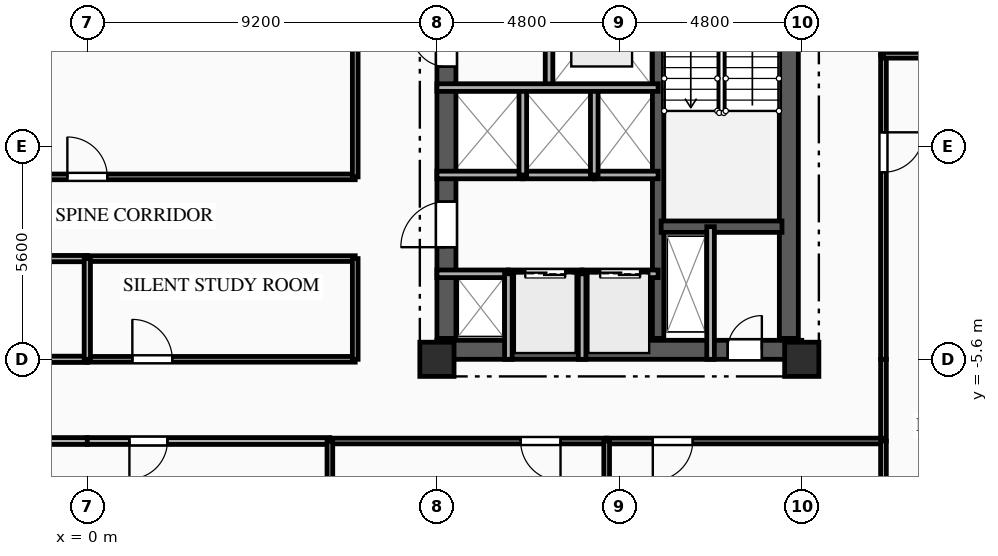
"""IFC4 building model, lengths in metres.
Left out: names, types, materials, properties, quantities, classifications, styles, units other than length and angle.
Written with IfcOpenShell. Run it as: python <this file> out.ifc"""

import sys

from ifc_helpers import new_model, si_unit, direction, frame, frame_2d, origin, origin_2d, place, context, subcontext, project, spatial, rectangle, extrude, element, fill, save


model = new_model("IFC4")
c1 = context("Model", 3, precision=1e-05, world=origin(), true_north=direction((0.0, 1.0)))
c2 = subcontext(c1, "Body", "Model", "MODEL_VIEW")
j1 = project(units=[si_unit("LENGTHUNIT", "METRE"), si_unit("PLANEANGLEUNIT", "RADIAN")], contexts=[c1])
p1 = place(None, origin())
s1 = spatial("IfcSite", under=j1, at=p1, CompositionType="ELEMENT")
p2 = place(p1, origin())
s2 = spatial("IfcBuilding", under=s1, at=p2, CompositionType="ELEMENT")
p3 = place(p2, frame((0.0, 0.0, 164.5)))
s3 = spatial("IfcBuildingStorey", under=s2, at=p3, CompositionType="ELEMENT", Elevation=164.5)
for number, where, z_axis, x_axis in (
    (1, (9.2, -5.6, 0.0), (0.0, 0.0, 1.0), (1.0, 0.0, 0.0)),
    (2, (18.8, -5.6, 0.0), (0.0, 0.0, 1.0), (1.0, 0.0, 0.0)),
):
    element("IfcColumn", number, at=place(p3, frame(where, z_axis=z_axis, x_axis=x_axis)), inside=s3, PredefinedType="COLUMN", context=c2, shape_type="SweptSolid", body=[
        extrude(rectangle(XDim=0.9, YDim=0.9, at=origin_2d()), origin(), (0.0, 0.0, 1.0), 3.35),
    ])
p4 = place(p3, frame((9.2, -5.35, 0.0), z_axis=(0.0, 0.0, 1.0), x_axis=(1.0, 0.0, 0.0)))
e3 = element("IfcWall", 3, at=p4, inside=s3, PredefinedType="SHEAR", context=c2, shape_type="SweptSolid", body=[
    extrude(rectangle(XDim=9.6, YDim=0.5, at=frame_2d((4.8, 0.0))), origin(), (0.0, 0.0, 1.0), 3.04),
])
p5 = place(p4, frame((7.65, 0.0, 0.0)))
e4 = element("IfcOpeningElement", 4, at=p5, cuts=e3, PredefinedType="OPENING", context=c2, shape_type="SweptSolid", body=[
    extrude(rectangle(XDim=0.9, YDim=2.1, at=frame_2d((0.45, 1.05))), frame((0.0, 0.26, 0.0), z_axis=(0.0, -1.0, 0.0), x_axis=(1.0, 0.0, 0.0)), (0.0, 0.0, 1.0), 0.52),
])
p6 = place(p3, frame((9.45, -5.05, 0.0), z_axis=(0.0, 0.0, 1.0), x_axis=(0.0, 1.0, 0.0)))
e5 = element("IfcWall", 5, at=p6, inside=s3, PredefinedType="SHEAR", context=c2, shape_type="SweptSolid", body=[
    extrude(rectangle(XDim=10.1, YDim=0.5, at=frame_2d((5.05, 0.0))), origin(), (0.0, 0.0, 1.0), 3.04),
])
p7 = place(p6, frame((7.15, 0.0, 0.0)))
e6 = element("IfcOpeningElement", 6, at=p7, cuts=e5, PredefinedType="OPENING", context=c2, shape_type="SweptSolid", body=[
    extrude(rectangle(XDim=0.9, YDim=2.1, at=frame_2d((0.45, 1.05))), frame((0.0, 0.26, 0.0), z_axis=(0.0, -1.0, 0.0), x_axis=(1.0, 0.0, 0.0)), (0.0, 0.0, 1.0), 0.52),
])
p8 = place(p6, frame((2.4, 0.0, 0.0)))
e7 = element("IfcOpeningElement", 7, at=p8, cuts=e5, PredefinedType="OPENING", context=c2, shape_type="SweptSolid", body=[
    extrude(rectangle(XDim=1.2, YDim=2.15, at=frame_2d((0.6, 1.075))), frame((0.0, 0.26, 0.0), z_axis=(0.0, -1.0, 0.0), x_axis=(1.0, 0.0, 0.0)), (0.0, 0.0, 1.0), 0.52),
])
p9 = place(p3, frame((18.46, -5.05, 0.0), z_axis=(0.0, 0.0, 1.0), x_axis=(0.0, 1.0, 0.0)))
e8 = element("IfcWall", 8, at=p9, inside=s3, PredefinedType="SHEAR", context=c2, shape_type="SweptSolid", body=[
    extrude(rectangle(XDim=10.1, YDim=0.5, at=frame_2d((5.05, 0.0))), origin(), (0.0, 0.0, 1.0), 3.04),
])
p10 = place(p3, frame((15.02, -5.05, 0.0), z_axis=(0.0, 0.0, 1.0), x_axis=(0.0, 1.0, 0.0)))
e9 = element("IfcWall", 9, at=p10, inside=s3, PredefinedType="SHEAR", context=c2, shape_type="SweptSolid", body=[
    extrude(rectangle(XDim=10.1, YDim=0.3, at=frame_2d((5.05, 0.0))), origin(), (0.0, 0.0, 1.0), 3.04),
])
p11 = place(p3, frame((15.1, -2.11, 0.0), z_axis=(0.0, 0.0, 1.0), x_axis=(1.0, 0.0, 0.0)))
e10 = element("IfcWall", 10, at=p11, inside=s3, PredefinedType="SHEAR", context=c2, shape_type="SweptSolid", body=[
    extrude(rectangle(XDim=3.18, YDim=0.3, at=frame_2d((1.59, 0.0))), origin(), (0.0, 0.0, 1.0), 3.04),
])
p12 = place(p3, frame((16.4, -2.11, 0.0), z_axis=(0.0, 0.0, 1.0), x_axis=(0.0, -1.0, 0.0)))
e11 = element("IfcWall", 11, at=p12, inside=s3, PredefinedType="PARTITIONING", context=c2, shape_type="SweptSolid", body=[
    extrude(rectangle(XDim=3.49, YDim=0.2, at=frame_2d((1.745, 0.0))), origin(), (0.0, 0.0, 1.0), 3.04),
])
p13 = place(p3, frame((12.15, 5.6, 0.0), z_axis=(0.0, 0.0, 1.0), x_axis=(0.0, -1.0, 0.0)))
e12 = element("IfcWall", 12, at=p13, inside=s3, PredefinedType="PARTITIONING", context=c2, shape_type="SweptSolid", body=[
    extrude(rectangle(XDim=4.05, YDim=0.2, at=frame_2d((2.025, 0.0))), origin(), (0.0, 0.0, 1.0), 3.04),
])
p14 = place(p3, frame((9.2, -3.35, 0.0), z_axis=(0.0, 0.0, 1.0), x_axis=(1.0, 0.0, 0.0)))
e13 = element("IfcWall", 13, at=p14, inside=s3, PredefinedType="PARTITIONING", context=c2, shape_type="SweptSolid", body=[
    extrude(rectangle(XDim=1.88, YDim=0.2, at=frame_2d((0.94, 0.0))), origin(), (0.0, 0.0, 1.0), 2.755),
])
p15 = place(p3, frame((11.08, -3.35, 0.0), z_axis=(0.0, 0.0, 1.0), x_axis=(1.0, 0.0, 0.0)))
e14 = element("IfcWall", 14, at=p15, inside=s3, PredefinedType="PARTITIONING", context=c2, shape_type="SweptSolid", body=[
    extrude(rectangle(XDim=1.94, YDim=0.2, at=frame_2d((0.97, 0.0))), origin(), (0.0, 0.0, 1.0), 3.04),
])
p16 = place(p15, frame((0.445, 0.0, 0.0)))
e15 = element("IfcOpeningElement", 15, at=p16, cuts=e14, PredefinedType="OPENING", context=c2, shape_type="SweptSolid", body=[
    extrude(rectangle(XDim=1.05, YDim=2.1, at=frame_2d((0.525, 1.05))), frame((0.0, 0.11, 0.0), z_axis=(0.0, -1.0, 0.0), x_axis=(1.0, 0.0, 0.0)), (0.0, 0.0, 1.0), 0.22),
])
p17 = place(p3, frame((13.02, -3.35, 0.0), z_axis=(0.0, 0.0, 1.0), x_axis=(1.0, 0.0, 0.0)))
e16 = element("IfcWall", 16, at=p17, inside=s3, PredefinedType="PARTITIONING", context=c2, shape_type="SweptSolid", body=[
    extrude(rectangle(XDim=2.0, YDim=0.2, at=frame_2d((1.0, 0.0))), origin(), (0.0, 0.0, 1.0), 3.04),
])
p18 = place(p17, frame((0.475, 0.0, 0.0)))
e17 = element("IfcOpeningElement", 17, at=p18, cuts=e16, PredefinedType="OPENING", context=c2, shape_type="SweptSolid", body=[
    extrude(rectangle(XDim=1.05, YDim=2.1, at=frame_2d((0.525, 1.05))), frame((0.0, 0.11, 0.0), z_axis=(0.0, -1.0, 0.0), x_axis=(1.0, 0.0, 0.0)), (0.0, 0.0, 1.0), 0.22),
])
p19 = place(p3, frame((11.46, -0.75, 0.0), z_axis=(0.0, 0.0, 1.0), x_axis=(-1.0, 0.0, 0.0)))
e18 = element("IfcWall", 18, at=p19, inside=s3, PredefinedType="PARTITIONING", context=c2, shape_type="SweptSolid", body=[
    extrude(rectangle(XDim=2.26, YDim=0.2, at=frame_2d((1.13, 0.0))), origin(), (0.0, 0.0, 1.0), 3.04),
])
p20 = place(p3, frame((13.34, -0.75, 0.0), z_axis=(0.0, 0.0, 1.0), x_axis=(-1.0, 0.0, 0.0)))
e19 = element("IfcWall", 19, at=p20, inside=s3, PredefinedType="PARTITIONING", context=c2, shape_type="SweptSolid", body=[
    extrude(rectangle(XDim=1.88, YDim=0.2, at=frame_2d((0.94, 0.0))), origin(), (0.0, 0.0, 1.0), 3.04),
])
p21 = place(p3, frame((15.02, -0.75, 0.0), z_axis=(0.0, 0.0, 1.0), x_axis=(-1.0, 0.0, 0.0)))
e20 = element("IfcWall", 20, at=p21, inside=s3, PredefinedType="PARTITIONING", context=c2, shape_type="SweptSolid", body=[
    extrude(rectangle(XDim=1.68, YDim=0.2, at=frame_2d((0.84, 0.0))), origin(), (0.0, 0.0, 1.0), 3.04),
])
for number, where, z_axis, x_axis in (
    (21, (11.08, -5.6, 0.0), (0.0, 0.0, 1.0), (0.0, 1.0, 0.0)),
    (22, (13.02, -5.6, 0.0), (0.0, 0.0, 1.0), (0.0, 1.0, 0.0)),
):
    element("IfcWall", number, at=place(p3, frame(where, z_axis=z_axis, x_axis=x_axis)), inside=s3, PredefinedType="PARTITIONING", context=c2, shape_type="SweptSolid", body=[
        extrude(rectangle(XDim=2.25, YDim=0.2, at=frame_2d((1.125, 0.0))), origin(), (0.0, 0.0, 1.0), 3.04),
    ])
for number, where, z_axis, x_axis in (
    (23, (11.46, -0.75, 0.0), (0.0, 0.0, 1.0), (0.0, 1.0, 0.0)),
    (24, (13.34, -0.75, 0.0), (0.0, 0.0, 1.0), (0.0, 1.0, 0.0)),
):
    element("IfcWall", number, at=place(p3, frame(where, z_axis=z_axis, x_axis=x_axis)), inside=s3, PredefinedType="PARTITIONING", context=c2, shape_type="SweptSolid", body=[
        extrude(rectangle(XDim=2.3, YDim=0.2, at=frame_2d((1.15, 0.0))), origin(), (0.0, 0.0, 1.0), 3.04),
    ])
p22 = place(p3, frame((0.0, -7.75, 0.0), z_axis=(0.0, 0.0, 1.0), x_axis=(-1.0, 0.0, 0.0)))
e25 = element("IfcWall", 25, at=p22, inside=s3, PredefinedType="PARTITIONING", context=c2, shape_type="SweptSolid", body=[
    extrude(rectangle(XDim=5.133, YDim=0.18, at=frame_2d((2.566, 0.0))), origin(), (0.0, 0.0, 1.0), 3.04),
])
p23 = place(p3, frame((-7.05, -5.6, 0.0), z_axis=(0.0, 0.0, 1.0), x_axis=(1.0, 0.0, 0.0)))
e26 = element("IfcWall", 26, at=p23, inside=s3, PredefinedType="PARTITIONING", context=c2, shape_type="SweptSolid", body=[
    extrude(rectangle(XDim=7.05, YDim=0.165, at=frame_2d((3.525, 0.0))), origin(), (0.0, 0.0, 1.0), 2.525),
])
p24 = place(p23, frame((4.728, 0.0, 0.0)))
e27 = element("IfcOpeningElement", 27, at=p24, cuts=e26, PredefinedType="OPENING", context=c2, shape_type="SweptSolid", body=[
    extrude(rectangle(XDim=1.15, YDim=2.15, at=frame_2d((0.575, 1.075))), frame((0.0, 0.093, 0.0), z_axis=(0.0, -1.0, 0.0), x_axis=(1.0, 0.0, 0.0)), (0.0, 0.0, 1.0), 0.185),
])
p25 = place(p3, frame((20.95, -5.6, 0.0), z_axis=(0.0, 0.0, 1.0), x_axis=(0.0, -1.0, 0.0)))
e28 = element("IfcWall", 28, at=p25, inside=s3, PredefinedType="PARTITIONING", context=c2, shape_type="SweptSolid", body=[
    extrude(rectangle(XDim=2.15, YDim=0.15, at=frame_2d((1.075, 0.0))), origin(), (0.0, 0.0, 1.0), 3.04),
])
p26 = place(p3, frame((6.383, -7.75, 0.0), z_axis=(0.0, 0.0, 1.0), x_axis=(-1.0, 0.0, 0.0)))
e29 = element("IfcWall", 29, at=p26, inside=s3, PredefinedType="PARTITIONING", context=c2, shape_type="SweptSolid", body=[
    extrude(rectangle(XDim=6.383, YDim=0.18, at=frame_2d((3.191, 0.0))), origin(), (0.0, 0.0, 1.0), 3.04),
])
p27 = place(p26, frame((4.275, 0.0, 0.0)))
e30 = element("IfcOpeningElement", 30, at=p27, cuts=e29, PredefinedType="OPENING", context=c2, shape_type="SweptSolid", body=[
    extrude(rectangle(XDim=1.0, YDim=2.15, at=frame_2d((0.5, 1.075))), frame((0.0, 0.1, 0.0), z_axis=(0.0, -1.0, 0.0), x_axis=(1.0, 0.0, 0.0)), (0.0, 0.0, 1.0), 0.2),
])
p28 = place(p3, frame((13.667, -7.75, 0.0), z_axis=(0.0, 0.0, 1.0), x_axis=(-1.0, 0.0, 0.0)))
e31 = element("IfcWall", 31, at=p28, inside=s3, PredefinedType="PARTITIONING", context=c2, shape_type="SweptSolid", body=[
    extrude(rectangle(XDim=7.283, YDim=0.15, at=frame_2d((3.642, 0.0))), origin(), (0.0, 0.0, 1.0), 3.04),
])
p29 = place(p28, frame((1.214, 0.0, 0.0)))
e32 = element("IfcOpeningElement", 32, at=p29, cuts=e31, PredefinedType="OPENING", context=c2, shape_type="SweptSolid", body=[
    extrude(rectangle(XDim=1.05, YDim=2.15, at=frame_2d((0.525, 1.075))), frame((0.0, 0.085, 0.0), z_axis=(0.0, -1.0, 0.0), x_axis=(1.0, 0.0, 0.0)), (0.0, 0.0, 1.0), 0.17),
])
p30 = place(p3, frame((20.95, -7.75, 0.0), z_axis=(0.0, 0.0, 1.0), x_axis=(-1.0, 0.0, 0.0)))
e33 = element("IfcWall", 33, at=p30, inside=s3, PredefinedType="PARTITIONING", context=c2, shape_type="SweptSolid", body=[
    extrude(rectangle(XDim=7.283, YDim=0.15, at=frame_2d((3.642, 0.0))), origin(), (0.0, 0.0, 1.0), 3.04),
])
p31 = place(p30, frame((5.019, 0.0, 0.0)))
e34 = element("IfcOpeningElement", 34, at=p31, cuts=e33, PredefinedType="OPENING", context=c2, shape_type="SweptSolid", body=[
    extrude(rectangle(XDim=1.05, YDim=2.15, at=frame_2d((0.525, 1.075))), frame((0.0, 0.085, 0.0), z_axis=(0.0, -1.0, 0.0), x_axis=(1.0, 0.0, 0.0)), (0.0, 0.0, 1.0), 0.17),
])
p32 = place(p3, frame((0.0, -5.6, 0.0), z_axis=(0.0, 0.0, 1.0), x_axis=(1.0, 0.0, 0.0)))
e35 = element("IfcWall", 35, at=p32, inside=s3, PredefinedType="PARTITIONING", context=c2, shape_type="SweptSolid", body=[
    extrude(rectangle(XDim=7.05, YDim=0.15, at=frame_2d((3.525, 0.0))), origin(), (0.0, 0.0, 1.0), 2.525),
])
p33 = place(p32, frame((1.185, 0.0, 0.0)))
e36 = element("IfcOpeningElement", 36, at=p33, cuts=e35, PredefinedType="OPENING", context=c2, shape_type="SweptSolid", body=[
    extrude(rectangle(XDim=1.05, YDim=2.15, at=frame_2d((0.525, 1.075))), frame((0.0, 0.085, 0.0), z_axis=(0.0, -1.0, 0.0), x_axis=(1.0, 0.0, 0.0)), (0.0, 0.0, 1.0), 0.17),
])
p34 = place(p3, frame((20.95, 2.4, 0.0), z_axis=(0.0, 0.0, 1.0), x_axis=(0.0, -1.0, 0.0)))
e37 = element("IfcWall", 37, at=p34, inside=s3, PredefinedType="PARTITIONING", context=c2, shape_type="SweptSolid", body=[
    extrude(rectangle(XDim=8.0, YDim=0.15, at=frame_2d((4.0, 0.0))), origin(), (0.0, 0.0, 1.0), 3.04),
])
p35 = place(p34, frame((2.028, 0.0, 0.0)))
e38 = element("IfcOpeningElement", 38, at=p35, cuts=e37, PredefinedType="OPENING", context=c2, shape_type="SweptSolid", body=[
    extrude(rectangle(XDim=1.05, YDim=2.15, at=frame_2d((0.525, 1.075))), frame((0.0, 0.085, 0.0), z_axis=(0.0, -1.0, 0.0), x_axis=(1.0, 0.0, 0.0)), (0.0, 0.0, 1.0), 0.17),
])
p36 = place(p3, frame((20.95, 8.5, 0.0), z_axis=(0.0, 0.0, 1.0), x_axis=(0.0, -1.0, 0.0)))
e39 = element("IfcWall", 39, at=p36, inside=s3, PredefinedType="PARTITIONING", context=c2, shape_type="SweptSolid", body=[
    extrude(rectangle(XDim=6.1, YDim=0.15, at=frame_2d((3.05, 0.0))), origin(), (0.0, 0.0, 1.0), 3.04),
])
p37 = place(p36, frame((3.984, 0.0, 0.0)))
e40 = element("IfcOpeningElement", 40, at=p37, cuts=e39, PredefinedType="OPENING", context=c2, shape_type="SweptSolid", body=[
    extrude(rectangle(XDim=1.05, YDim=2.15, at=frame_2d((0.525, 1.075))), frame((0.0, 0.085, 0.0), z_axis=(0.0, -1.0, 0.0), x_axis=(1.0, 0.0, 0.0)), (0.0, 0.0, 1.0), 0.17),
])
p38 = place(p3, frame((-7.05, -0.8, 0.0), z_axis=(0.0, 0.0, 1.0), x_axis=(1.0, 0.0, 0.0)))
e41 = element("IfcWall", 41, at=p38, inside=s3, PredefinedType="PARTITIONING", context=c2, shape_type="SweptSolid", body=[
    extrude(rectangle(XDim=14.1, YDim=0.15, at=frame_2d((7.05, 0.0))), origin(), (0.0, 0.0, 1.0), 3.04),
])
p39 = place(p38, frame((6.525, 0.0, 0.0)))
e42 = element("IfcOpeningElement", 42, at=p39, cuts=e41, PredefinedType="OPENING", context=c2, shape_type="SweptSolid", body=[
    extrude(rectangle(XDim=1.05, YDim=2.15, at=frame_2d((0.525, 1.075))), frame((0.0, 0.085, 0.0), z_axis=(0.0, -1.0, 0.0), x_axis=(1.0, 0.0, 0.0)), (0.0, 0.0, 1.0), 0.17),
])
p40 = place(p3, frame((0.0, -2.95, 0.0), z_axis=(0.0, 0.0, 1.0), x_axis=(-1.0, 0.0, 0.0)))
e43 = element("IfcWall", 43, at=p40, inside=s3, PredefinedType="PARTITIONING", context=c2, shape_type="SweptSolid", body=[
    extrude(rectangle(XDim=7.05, YDim=0.165, at=frame_2d((3.525, 0.0))), origin(), (0.0, 0.0, 1.0), 3.04),
])
p41 = place(p3, frame((7.05, -2.95, 0.0), z_axis=(0.0, 0.0, 1.0), x_axis=(-1.0, 0.0, 0.0)))
e44 = element("IfcWall", 44, at=p41, inside=s3, PredefinedType="PARTITIONING", context=c2, shape_type="SweptSolid", body=[
    extrude(rectangle(XDim=7.05, YDim=0.15, at=frame_2d((3.525, 0.0))), origin(), (0.0, 0.0, 1.0), 3.04),
])
p42 = place(p3, frame((7.05, -0.8, 0.0), z_axis=(0.0, 0.0, 1.0), x_axis=(0.0, 1.0, 0.0)))
e45 = element("IfcWall", 45, at=p42, inside=s3, PredefinedType="PARTITIONING", context=c2, shape_type="SweptSolid", body=[
    extrude(rectangle(XDim=9.3, YDim=0.15, at=frame_2d((4.65, 0.0))), origin(), (0.0, 0.0, 1.0), 3.04),
])
p43 = place(p3, frame((7.05, -5.6, 0.0), z_axis=(0.0, 0.0, 1.0), x_axis=(0.0, 1.0, 0.0)))
e46 = element("IfcWall", 46, at=p43, inside=s3, PredefinedType="PARTITIONING", context=c2, shape_type="SweptSolid", body=[
    extrude(rectangle(XDim=2.65, YDim=0.15, at=frame_2d((1.325, 0.0))), origin(), (0.0, 0.0, 1.0), 3.04),
])
p44 = place(p3, frame((20.95, 2.4, 0.0), z_axis=(0.0, 0.0, 1.0), x_axis=(1.0, 0.0, 0.0)))
e47 = element("IfcWall", 47, at=p44, inside=s3, PredefinedType="PARTITIONING", context=c2, shape_type="SweptSolid", body=[
    extrude(rectangle(XDim=6.05, YDim=0.15, at=frame_2d((3.025, 0.0))), origin(), (0.0, 0.0, 1.0), 3.04),
])
for number, where, z_axis, x_axis in (
    (48, (20.95, -15.6, 0.0), (0.0, 0.0, 1.0), (0.0, 1.0, 0.0)),
    (49, (6.383, -7.75, 0.0), (0.0, 0.0, 1.0), (0.0, -1.0, 0.0)),
    (50, (13.667, -7.75, 0.0), (0.0, 0.0, 1.0), (0.0, -1.0, 0.0)),
):
    element("IfcWall", number, at=place(p3, frame(where, z_axis=z_axis, x_axis=x_axis)), inside=s3, PredefinedType="PARTITIONING", context=c2, shape_type="SweptSolid", body=[
        extrude(rectangle(XDim=7.85, YDim=0.15, at=frame_2d((3.925, 0.0))), origin(), (0.0, 0.0, 1.0), 3.04),
    ])
p45 = place(p3, frame((0.0, -2.95, 0.0), z_axis=(0.0, 0.0, 1.0), x_axis=(0.0, -1.0, 0.0)))
e51 = element("IfcWall", 51, at=p45, inside=s3, PredefinedType="PARTITIONING", context=c2, shape_type="SweptSolid", body=[
    extrude(rectangle(XDim=2.65, YDim=0.165, at=frame_2d((1.325, 0.0))), origin(), (0.0, 0.0, 1.0), 3.04),
])
p46 = place(p3, frame((9.2, 1.55, 0.0), z_axis=(0.0, 0.0, 1.0), x_axis=(1.0, 0.0, 0.0)))
e52 = element("IfcWall", 52, at=p46, inside=s3, PredefinedType="PARTITIONING", context=c2, shape_type="SweptSolid", body=[
    extrude(rectangle(XDim=5.82, YDim=0.2, at=frame_2d((2.91, 0.0))), origin(), (0.0, 0.0, 1.0), 3.04),
])
p47 = place(p5, origin())
e53 = element("IfcDoor", 53, at=p47, inside=s3, OperationType="SINGLE_SWING_RIGHT", PredefinedType="DOOR", context=c2, shape_type="SweptSolid", body=[
    extrude(rectangle(XDim=0.9, YDim=2.1, at=frame_2d((0.45, 1.05))), frame((0.0, 0.025, 0.0), z_axis=(0.0, -1.0, 0.0), x_axis=(1.0, 0.0, 0.0)), (0.0, 0.0, 1.0), 0.05),
])
fill(e4, e53)
p48 = place(p7, origin())
e54 = element("IfcDoor", 54, at=p48, inside=s3, OperationType="SINGLE_SWING_RIGHT", PredefinedType="DOOR", context=c2, shape_type="SweptSolid", body=[
    extrude(rectangle(XDim=0.9, YDim=2.1, at=frame_2d((0.45, 1.05))), frame((0.0, 0.025, 0.0), z_axis=(0.0, -1.0, 0.0), x_axis=(1.0, 0.0, 0.0)), (0.0, 0.0, 1.0), 0.05),
])
fill(e6, e54)
p49 = place(p16, origin())
e55 = element("IfcDoor", 55, at=p49, inside=s3, OperationType="DOUBLE_DOOR_SLIDING", PredefinedType="DOOR", context=c2, shape_type="SweptSolid", body=[
    extrude(rectangle(XDim=1.05, YDim=2.1, at=frame_2d((0.525, 1.05))), frame((0.0, 0.025, 0.0), z_axis=(0.0, -1.0, 0.0), x_axis=(1.0, 0.0, 0.0)), (0.0, 0.0, 1.0), 0.05),
])
fill(e15, e55)
p50 = place(p18, origin())
e56 = element("IfcDoor", 56, at=p50, inside=s3, OperationType="DOUBLE_DOOR_SLIDING", PredefinedType="DOOR", context=c2, shape_type="SweptSolid", body=[
    extrude(rectangle(XDim=1.05, YDim=2.1, at=frame_2d((0.525, 1.05))), frame((0.0, 0.025, 0.0), z_axis=(0.0, -1.0, 0.0), x_axis=(1.0, 0.0, 0.0)), (0.0, 0.0, 1.0), 0.05),
])
fill(e17, e56)
p51 = place(p8, origin())
e57 = element("IfcDoor", 57, at=p51, inside=s3, OperationType="SINGLE_SWING_LEFT", PredefinedType="DOOR", context=c2, shape_type="SweptSolid", body=[
    extrude(rectangle(XDim=1.2, YDim=2.15, at=frame_2d((0.6, 1.075))), frame((0.0, 0.025, 0.0), z_axis=(0.0, -1.0, 0.0), x_axis=(1.0, 0.0, 0.0)), (0.0, 0.0, 1.0), 0.05),
])
fill(e7, e57)
p52 = place(p27, origin())
e58 = element("IfcDoor", 58, at=p52, inside=s3, OperationType="SINGLE_SWING_RIGHT", PredefinedType="DOOR", context=c2, shape_type="SweptSolid", body=[
    extrude(rectangle(XDim=1.0, YDim=2.15, at=frame_2d((0.5, 1.075))), frame((0.0, 0.025, 0.0), z_axis=(0.0, -1.0, 0.0), x_axis=(1.0, 0.0, 0.0)), (0.0, 0.0, 1.0), 0.05),
])
fill(e30, e58)
p53 = place(p29, origin())
e59 = element("IfcDoor", 59, at=p53, inside=s3, OperationType="SINGLE_SWING_LEFT", PredefinedType="DOOR", context=c2, shape_type="SweptSolid", body=[
    extrude(rectangle(XDim=1.05, YDim=2.15, at=frame_2d((0.525, 1.075))), frame((0.0, 0.025, 0.0), z_axis=(0.0, -1.0, 0.0), x_axis=(1.0, 0.0, 0.0)), (0.0, 0.0, 1.0), 0.05),
])
fill(e32, e59)
p54 = place(p31, origin())
e60 = element("IfcDoor", 60, at=p54, inside=s3, OperationType="SINGLE_SWING_RIGHT", PredefinedType="DOOR", context=c2, shape_type="SweptSolid", body=[
    extrude(rectangle(XDim=1.05, YDim=2.15, at=frame_2d((0.525, 1.075))), frame((0.0, 0.025, 0.0), z_axis=(0.0, -1.0, 0.0), x_axis=(1.0, 0.0, 0.0)), (0.0, 0.0, 1.0), 0.05),
])
fill(e34, e60)
p55 = place(p33, origin())
e61 = element("IfcDoor", 61, at=p55, inside=s3, OperationType="SINGLE_SWING_LEFT", PredefinedType="DOOR", context=c2, shape_type="SweptSolid", body=[
    extrude(rectangle(XDim=1.05, YDim=2.15, at=frame_2d((0.525, 1.075))), frame((0.0, 0.025, 0.0), z_axis=(0.0, -1.0, 0.0), x_axis=(1.0, 0.0, 0.0)), (0.0, 0.0, 1.0), 0.05),
])
fill(e36, e61)
p56 = place(p35, origin())
e62 = element("IfcDoor", 62, at=p56, inside=s3, OperationType="SINGLE_SWING_LEFT", PredefinedType="DOOR", context=c2, shape_type="SweptSolid", body=[
    extrude(rectangle(XDim=1.05, YDim=2.15, at=frame_2d((0.525, 1.075))), frame((0.0, 0.025, 0.0), z_axis=(0.0, -1.0, 0.0), x_axis=(1.0, 0.0, 0.0)), (0.0, 0.0, 1.0), 0.05),
])
fill(e38, e62)
p57 = place(p39, origin())
e63 = element("IfcDoor", 63, at=p57, inside=s3, OperationType="SINGLE_SWING_LEFT", PredefinedType="DOOR", context=c2, shape_type="SweptSolid", body=[
    extrude(rectangle(XDim=1.05, YDim=2.15, at=frame_2d((0.525, 1.075))), frame((0.0, 0.025, 0.0), z_axis=(0.0, -1.0, 0.0), x_axis=(1.0, 0.0, 0.0)), (0.0, 0.0, 1.0), 0.05),
])
fill(e42, e63)
save(model, sys.argv[1])
